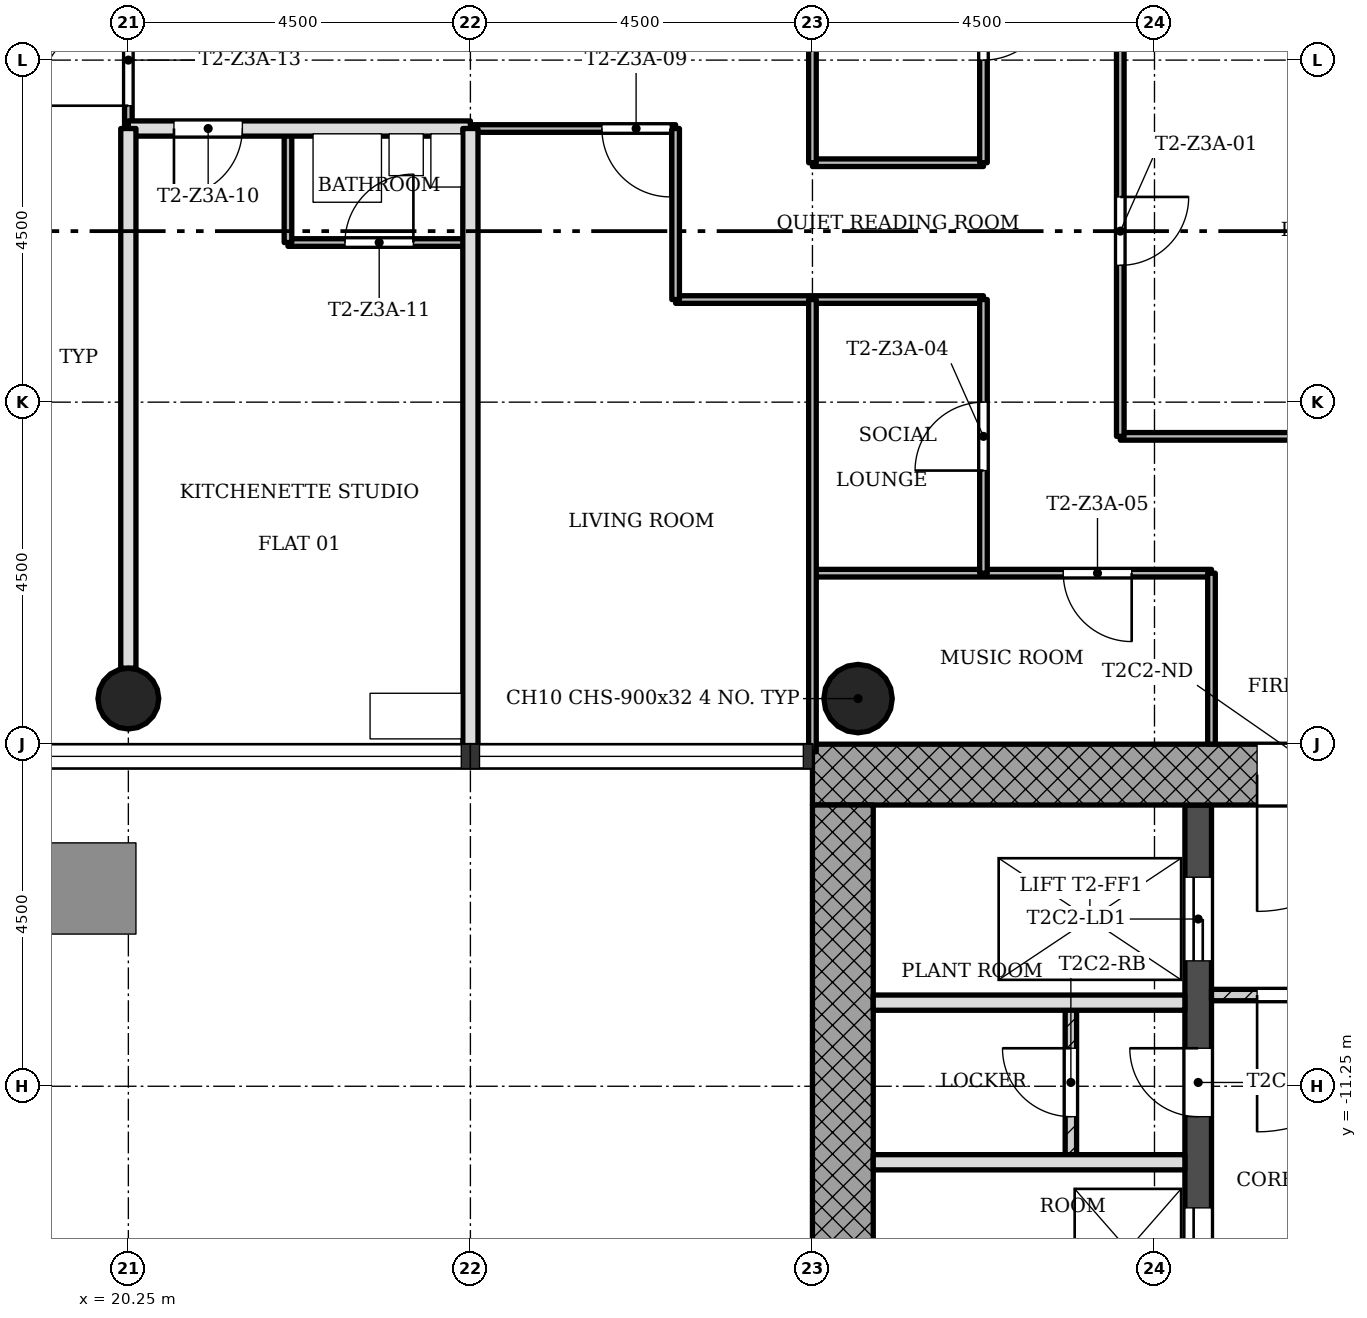
"""IFC4 building model, lengths in metres.
Left out: names, types, materials, properties, quantities, classifications, styles, units other than length and angle.
Written with IfcOpenShell. Run it as: python <this file> out.ifc"""

import sys

from ifc_helpers import new_model, si_unit, direction, frame, frame_2d, origin, origin_2d, place, context, subcontext, project, spatial, rectangle, hollow_circle, extrude, element, fill, save


model = new_model("IFC4")
c1 = context("Model", 3, precision=1e-05, world=origin(), true_north=direction((0.0, 1.0)))
c2 = subcontext(c1, "Body", "Model", "MODEL_VIEW")
j1 = project(units=[si_unit("LENGTHUNIT", "METRE"), si_unit("PLANEANGLEUNIT", "RADIAN")], contexts=[c1])
p1 = place(None, origin())
s1 = spatial("IfcSite", under=j1, at=p1, CompositionType="ELEMENT")
p2 = place(p1, origin())
s2 = spatial("IfcBuilding", under=s1, at=p2, CompositionType="ELEMENT")
p3 = place(p2, frame((0.0, 0.0, 137.1)))
s3 = spatial("IfcBuildingStorey", under=s2, at=p3, CompositionType="ELEMENT", Elevation=137.1)
p4 = place(p3, frame((41.95, -7.15, 0.0), z_axis=(0.0, 0.0, 1.0), x_axis=(-1.0, 0.0, 0.0)))
e1 = element("IfcWall", 1, at=p4, inside=s3, PredefinedType="SHEAR", context=c2, shape_type="SweptSolid", body=[
    extrude(rectangle(XDim=12.7, YDim=0.8, at=frame_2d((6.35, 0.0))), origin(), (0.0, 0.0, 1.0), 3.4),
])
p5 = place(p4, frame((5.05, 0.0, 0.0)))
e2 = element("IfcOpeningElement", 2, at=p5, cuts=e1, PredefinedType="OPENING", context=c2, shape_type="SweptSolid", body=[
    extrude(rectangle(XDim=1.8, YDim=2.1, at=frame_2d((0.9, 1.05))), frame((0.0, 0.41, 0.0), z_axis=(0.0, -1.0, 0.0), x_axis=(1.0, 0.0, 0.0)), (0.0, 0.0, 1.0), 0.82),
])
p6 = place(p3, frame((29.65, -7.55, 0.0), z_axis=(0.0, 0.0, 1.0), x_axis=(0.0, -1.0, 0.0)))
e3 = element("IfcWall", 3, at=p6, inside=s3, PredefinedType="SHEAR", context=c2, shape_type="SweptSolid", body=[
    extrude(rectangle(XDim=8.2, YDim=0.8, at=frame_2d((4.1, 0.0))), origin(), (0.0, 0.0, 1.0), 3.4),
])
p7 = place(p3, frame((34.325, -14.95, 0.0), z_axis=(0.0, 0.0, 1.0), x_axis=(0.0, 1.0, 0.0)))
e4 = element("IfcWall", 4, at=p7, inside=s3, PredefinedType="SHEAR", context=c2, shape_type="SweptSolid", body=[
    extrude(rectangle(XDim=7.4, YDim=0.35, at=frame_2d((3.7, 0.0))), origin(), (0.0, 0.0, 1.0), 3.4),
])
p8 = place(p7, frame((5.35, 0.0, 0.0)))
e5 = element("IfcOpeningElement", 5, at=p8, cuts=e4, PredefinedType="OPENING", context=c2, shape_type="SweptSolid", body=[
    extrude(rectangle(XDim=1.1, YDim=2.1, at=frame_2d((0.55, 1.05))), frame((0.0, 0.185, 0.0), z_axis=(0.0, -1.0, 0.0), x_axis=(1.0, 0.0, 0.0)), (0.0, 0.0, 1.0), 0.37),
])
p9 = place(p7, frame((1.0, 0.0, 0.0)))
e6 = element("IfcOpeningElement", 6, at=p9, cuts=e4, PredefinedType="OPENING", context=c2, shape_type="SweptSolid", body=[
    extrude(rectangle(XDim=1.1, YDim=2.1, at=frame_2d((0.55, 1.05))), frame((0.0, 0.185, 0.0), z_axis=(0.0, -1.0, 0.0), x_axis=(1.0, 0.0, 0.0)), (0.0, 0.0, 1.0), 0.37),
])
p10 = place(p7, frame((3.3, 0.0, 0.0)))
e7 = element("IfcOpeningElement", 7, at=p10, cuts=e4, PredefinedType="OPENING", context=c2, shape_type="SweptSolid", body=[
    extrude(rectangle(XDim=0.9, YDim=2.1, at=frame_2d((0.45, 1.05))), frame((0.0, 0.185, 0.0), z_axis=(0.0, -1.0, 0.0), x_axis=(1.0, 0.0, 0.0)), (0.0, 0.0, 1.0), 0.37),
])
p11 = place(p3, frame((20.25, -6.15, 0.0), z_axis=(0.0, 0.0, 1.0), x_axis=(1.0, 0.0, 0.0)))
e8 = element("IfcColumn", 8, at=p11, inside=s3, PredefinedType="COLUMN", context=c2, shape_type="SweptSolid", body=[
    extrude(hollow_circle(Radius=0.4, WallThickness=0.028, at=origin_2d()), origin(), (0.0, 0.0, 1.0), 3.4),
])
p12 = place(p3, frame((29.85, -6.15, 0.0), z_axis=(0.0, 0.0, 1.0), x_axis=(1.0, 0.0, 0.0)))
e9 = element("IfcColumn", 9, at=p12, inside=s3, PredefinedType="COLUMN", context=c2, shape_type="SweptSolid", body=[
    extrude(hollow_circle(Radius=0.45, WallThickness=0.032, at=origin_2d()), origin(), (0.0, 0.0, 1.0), 3.4),
])
p13 = place(p3, frame((34.5, -10.05, 0.0), z_axis=(0.0, 0.0, 1.0), x_axis=(1.0, 0.0, 0.0)))
e10 = element("IfcWall", 10, at=p13, inside=s3, PredefinedType="PARTITIONING", context=c2, shape_type="SweptSolid", body=[
    extrude(rectangle(XDim=3.0, YDim=0.15, at=frame_2d((1.5, 0.0))), origin(), (0.0, 0.0, 1.0), 3.0),
])
p14 = place(p13, frame((0.6, 0.0, 0.0)))
e11 = element("IfcOpeningElement", 11, at=p14, cuts=e10, PredefinedType="OPENING", context=c2, shape_type="SweptSolid", body=[
    extrude(rectangle(XDim=1.8, YDim=2.1, at=frame_2d((0.9, 1.05))), frame((0.0, 0.085, 0.0), z_axis=(0.0, -1.0, 0.0), x_axis=(1.0, 0.0, 0.0)), (0.0, 0.0, 1.0), 0.17),
])
for number, where, z_axis, x_axis in (
    (12, (30.05, -12.25, 0.0), (0.0, 0.0, 1.0), (1.0, 0.0, 0.0)),
    (13, (30.05, -10.15, 0.0), (0.0, 0.0, 1.0), (1.0, 0.0, 0.0)),
):
    element("IfcWall", number, at=place(p3, frame(where, z_axis=z_axis, x_axis=x_axis)), inside=s3, PredefinedType="SOLIDWALL", context=c2, shape_type="SweptSolid", body=[
        extrude(rectangle(XDim=4.1, YDim=0.2, at=frame_2d((2.05, 0.0))), origin(), (0.0, 0.0, 1.0), 3.0),
    ])
p15 = place(p3, frame((32.65, -10.15, 0.0), z_axis=(0.0, 0.0, 1.0), x_axis=(0.0, -1.0, 0.0)))
e14 = element("IfcWall", 14, at=p15, inside=s3, PredefinedType="PARTITIONING", context=c2, shape_type="SweptSolid", body=[
    extrude(rectangle(XDim=2.1, YDim=0.15, at=frame_2d((1.05, 0.0))), origin(), (0.0, 0.0, 1.0), 3.0),
])
p16 = place(p15, frame((0.6, 0.0, 0.0)))
e15 = element("IfcOpeningElement", 15, at=p16, cuts=e14, PredefinedType="OPENING", context=c2, shape_type="SweptSolid", body=[
    extrude(rectangle(XDim=0.9, YDim=2.1, at=frame_2d((0.45, 1.05))), frame((0.0, 0.085, 0.0), z_axis=(0.0, -1.0, 0.0), x_axis=(1.0, 0.0, 0.0)), (0.0, 0.0, 1.0), 0.17),
])
p17 = place(p3, frame((34.5, -4.5, 0.0), z_axis=(0.0, 0.0, 1.0), x_axis=(-1.0, 0.0, 0.0)))
e16 = element("IfcWall", 16, at=p17, inside=s3, PredefinedType="PARTITIONING", context=c2, shape_type="SweptSolid", body=[
    extrude(rectangle(XDim=5.25, YDim=0.1, at=frame_2d((2.625, 0.0))), origin(), (0.0, 0.0, 1.0), 3.0),
])
p18 = place(p17, frame((1.05, 0.0, 0.0)))
e17 = element("IfcOpeningElement", 17, at=p18, cuts=e16, PredefinedType="OPENING", context=c2, shape_type="SweptSolid", body=[
    extrude(rectangle(XDim=0.9, YDim=2.1, at=frame_2d((0.45, 1.05))), frame((0.0, 0.06, 0.0), z_axis=(0.0, -1.0, 0.0), x_axis=(1.0, 0.0, 0.0)), (0.0, 0.0, 1.0), 0.12),
])
p19 = place(p3, frame((38.7, -2.7, 0.0), z_axis=(0.0, 0.0, 1.0), x_axis=(-1.0, 0.0, 0.0)))
e18 = element("IfcWall", 18, at=p19, inside=s3, PredefinedType="PARTITIONING", context=c2, shape_type="SweptSolid", body=[
    extrude(rectangle(XDim=5.4, YDim=0.1, at=frame_2d((2.7, 0.0))), origin(), (0.0, 0.0, 1.0), 3.0),
])
p20 = place(p3, frame((31.5, -0.9, 0.0), z_axis=(0.0, 0.0, 1.0), x_axis=(-1.0, 0.0, 0.0)))
e19 = element("IfcWall", 19, at=p20, inside=s3, PredefinedType="PARTITIONING", context=c2, shape_type="SweptSolid", body=[
    extrude(rectangle(XDim=4.05, YDim=0.1, at=frame_2d((2.025, 0.0))), origin(), (0.0, 0.0, 1.0), 3.0),
])
p21 = place(p3, frame((24.75, -0.15, 0.0), z_axis=(0.0, 0.0, 1.0), x_axis=(-1.0, 0.0, 0.0)))
e20 = element("IfcWall", 20, at=p21, inside=s3, PredefinedType="PARTITIONING", context=c2, shape_type="SweptSolid", body=[
    extrude(rectangle(XDim=2.4, YDim=0.1, at=frame_2d((1.2, 0.0))), origin(), (0.0, 0.0, 1.0), 3.0),
])
p22 = place(p21, frame((0.75, 0.0, 0.0)))
e21 = element("IfcOpeningElement", 21, at=p22, cuts=e20, PredefinedType="OPENING", context=c2, shape_type="SweptSolid", body=[
    extrude(rectangle(XDim=0.9, YDim=2.1, at=frame_2d((0.45, 1.05))), frame((0.0, 0.06, 0.0), z_axis=(0.0, -1.0, 0.0), x_axis=(1.0, 0.0, 0.0)), (0.0, 0.0, 1.0), 0.12),
])
p23 = place(p3, frame((31.5, 0.9, 0.0), z_axis=(0.0, 0.0, 1.0), x_axis=(-1.0, 0.0, 0.0)))
e22 = element("IfcWall", 22, at=p23, inside=s3, PredefinedType="PARTITIONING", context=c2, shape_type="SweptSolid", body=[
    extrude(rectangle(XDim=2.25, YDim=0.1, at=frame_2d((1.125, 0.0))), origin(), (0.0, 0.0, 1.0), 3.0),
])
p24 = place(p3, frame((27.45, 1.35, 0.0), z_axis=(0.0, 0.0, 1.0), x_axis=(-1.0, 0.0, 0.0)))
e23 = element("IfcWall", 23, at=p24, inside=s3, PredefinedType="PARTITIONING", context=c2, shape_type="SweptSolid", body=[
    extrude(rectangle(XDim=2.7, YDim=0.1, at=frame_2d((1.35, 0.0))), origin(), (0.0, 0.0, 1.0), 3.0),
])
p25 = place(p24, frame((0.07, 0.0, 0.0)))
e24 = element("IfcOpeningElement", 24, at=p25, cuts=e23, PredefinedType="OPENING", context=c2, shape_type="SweptSolid", body=[
    extrude(rectangle(XDim=0.9, YDim=2.1, at=frame_2d((0.45, 1.05))), frame((0.0, 0.06, 0.0), z_axis=(0.0, -1.0, 0.0), x_axis=(1.0, 0.0, 0.0)), (0.0, 0.0, 1.0), 0.12),
])
p26 = place(p3, frame((24.75, 1.35, 0.0), z_axis=(0.0, 0.0, 1.0), x_axis=(-1.0, 0.0, 0.0)))
e25 = element("IfcWall", 25, at=p26, inside=s3, PredefinedType="SOLIDWALL", context=c2, shape_type="SweptSolid", body=[
    extrude(rectangle(XDim=4.5, YDim=0.2, at=frame_2d((2.25, 0.0))), origin(), (0.0, 0.0, 1.0), 3.0),
])
p27 = place(p26, frame((3.0, 0.0, 0.0)))
e26 = element("IfcOpeningElement", 26, at=p27, cuts=e25, PredefinedType="OPENING", context=c2, shape_type="SweptSolid", body=[
    extrude(rectangle(XDim=0.9, YDim=2.1, at=frame_2d((0.45, 1.05))), frame((0.0, 0.11, 0.0), z_axis=(0.0, -1.0, 0.0), x_axis=(1.0, 0.0, 0.0)), (0.0, 0.0, 1.0), 0.22),
])
p28 = place(p3, frame((34.5, -6.75, 0.0), z_axis=(0.0, 0.0, 1.0), x_axis=(0.0, 1.0, 0.0)))
e27 = element("IfcWall", 27, at=p28, inside=s3, PredefinedType="PARTITIONING", context=c2, shape_type="SweptSolid", body=[
    extrude(rectangle(XDim=2.25, YDim=0.1, at=frame_2d((1.125, 0.0))), origin(), (0.0, 0.0, 1.0), 3.0),
])
p29 = place(p3, frame((33.3, -2.7, 0.0), z_axis=(0.0, 0.0, 1.0), x_axis=(0.0, 1.0, 0.0)))
e28 = element("IfcWall", 28, at=p29, inside=s3, PredefinedType="PARTITIONING", context=c2, shape_type="SweptSolid", body=[
    extrude(rectangle(XDim=5.4, YDim=0.1, at=frame_2d((2.7, 0.0))), origin(), (0.0, 0.0, 1.0), 3.0),
])
p30 = place(p29, frame((2.25, 0.0, 0.0)))
e29 = element("IfcOpeningElement", 29, at=p30, cuts=e28, PredefinedType="OPENING", context=c2, shape_type="SweptSolid", body=[
    extrude(rectangle(XDim=0.9, YDim=2.1, at=frame_2d((0.45, 1.05))), frame((0.0, 0.06, 0.0), z_axis=(0.0, -1.0, 0.0), x_axis=(1.0, 0.0, 0.0)), (0.0, 0.0, 1.0), 0.12),
])
p31 = place(p3, frame((31.5, -4.5, 0.0), z_axis=(0.0, 0.0, 1.0), x_axis=(0.0, 1.0, 0.0)))
e30 = element("IfcWall", 30, at=p31, inside=s3, PredefinedType="PARTITIONING", context=c2, shape_type="SweptSolid", body=[
    extrude(rectangle(XDim=3.6, YDim=0.1, at=frame_2d((1.8, 0.0))), origin(), (0.0, 0.0, 1.0), 3.0),
])
p32 = place(p31, frame((1.35, 0.0, 0.0)))
e31 = element("IfcOpeningElement", 31, at=p32, cuts=e30, PredefinedType="OPENING", context=c2, shape_type="SweptSolid", body=[
    extrude(rectangle(XDim=0.9, YDim=2.1, at=frame_2d((0.45, 1.05))), frame((0.0, 0.06, 0.0), z_axis=(0.0, -1.0, 0.0), x_axis=(1.0, 0.0, 0.0)), (0.0, 0.0, 1.0), 0.12),
])
p33 = place(p3, frame((31.5, 0.9, 0.0), z_axis=(0.0, 0.0, 1.0), x_axis=(0.0, 1.0, 0.0)))
e32 = element("IfcWall", 32, at=p33, inside=s3, PredefinedType="PARTITIONING", context=c2, shape_type="SweptSolid", body=[
    extrude(rectangle(XDim=3.6, YDim=0.1, at=frame_2d((1.8, 0.0))), origin(), (0.0, 0.0, 1.0), 3.0),
])
p34 = place(p33, frame((1.35, 0.0, 0.0)))
e33 = element("IfcOpeningElement", 33, at=p34, cuts=e32, PredefinedType="OPENING", context=c2, shape_type="SweptSolid", body=[
    extrude(rectangle(XDim=0.9, YDim=2.1, at=frame_2d((0.45, 1.05))), frame((0.0, 0.06, 0.0), z_axis=(0.0, -1.0, 0.0), x_axis=(1.0, 0.0, 0.0)), (0.0, 0.0, 1.0), 0.12),
])
for number, where, z_axis, x_axis in (
    (34, (29.25, -6.85, 0.0), (0.0, 0.0, 1.0), (0.0, 1.0, 0.0)),
    (35, (29.25, 0.9, 0.0), (0.0, 0.0, 1.0), (0.0, 1.0, 0.0)),
):
    element("IfcWall", number, at=place(p3, frame(where, z_axis=z_axis, x_axis=x_axis)), inside=s3, PredefinedType="PARTITIONING", context=c2, shape_type="SweptSolid", body=[
        extrude(rectangle(XDim=5.95, YDim=0.1, at=frame_2d((2.975, 0.0))), origin(), (0.0, 0.0, 1.0), 3.0),
    ])
p35 = place(p3, frame((27.45, -0.9, 0.0), z_axis=(0.0, 0.0, 1.0), x_axis=(0.0, 1.0, 0.0)))
e36 = element("IfcWall", 36, at=p35, inside=s3, PredefinedType="PARTITIONING", context=c2, shape_type="SweptSolid", body=[
    extrude(rectangle(XDim=2.25, YDim=0.1, at=frame_2d((1.125, 0.0))), origin(), (0.0, 0.0, 1.0), 3.0),
])
p36 = place(p3, frame((24.75, -6.85, 0.0), z_axis=(0.0, 0.0, 1.0), x_axis=(0.0, 1.0, 0.0)))
e37 = element("IfcWall", 37, at=p36, inside=s3, PredefinedType="SOLIDWALL", context=c2, shape_type="SweptSolid", body=[
    extrude(rectangle(XDim=8.2, YDim=0.2, at=frame_2d((4.1, 0.0))), origin(), (0.0, 0.0, 1.0), 3.0),
])
p37 = place(p3, frame((22.35, -0.15, 0.0), z_axis=(0.0, 0.0, 1.0), x_axis=(0.0, 1.0, 0.0)))
e38 = element("IfcWall", 38, at=p37, inside=s3, PredefinedType="PARTITIONING", context=c2, shape_type="SweptSolid", body=[
    extrude(rectangle(XDim=1.5, YDim=0.1, at=frame_2d((0.75, 0.0))), origin(), (0.0, 0.0, 1.0), 3.0),
])
p38 = place(p3, frame((20.25, 1.35, 0.0), z_axis=(0.0, 0.0, 1.0), x_axis=(0.0, 1.0, 0.0)))
e39 = element("IfcWall", 39, at=p38, inside=s3, PredefinedType="PARTITIONING", context=c2, shape_type="SweptSolid", body=[
    extrude(rectangle(XDim=4.4, YDim=0.1, at=frame_2d((2.2, 0.0))), origin(), (0.0, 0.0, 1.0), 3.0),
])
p39 = place(p38, frame((0.3, 0.0, 0.0)))
e40 = element("IfcOpeningElement", 40, at=p39, cuts=e39, PredefinedType="OPENING", context=c2, shape_type="SweptSolid", body=[
    extrude(rectangle(XDim=1.2, YDim=2.1, at=frame_2d((0.6, 1.05))), frame((0.0, 0.06, 0.0), z_axis=(0.0, -1.0, 0.0), x_axis=(1.0, 0.0, 0.0)), (0.0, 0.0, 1.0), 0.12),
])
p40 = place(p3, frame((20.25, -5.75, 0.0), z_axis=(0.0, 0.0, 1.0), x_axis=(0.0, 1.0, 0.0)))
e41 = element("IfcWall", 41, at=p40, inside=s3, PredefinedType="SOLIDWALL", context=c2, shape_type="SweptSolid", body=[
    extrude(rectangle(XDim=7.1, YDim=0.2, at=frame_2d((3.55, 0.0))), origin(), (0.0, 0.0, 1.0), 3.0),
])
p41 = place(p14, origin())
e42 = element("IfcDoor", 42, at=p41, inside=s3, OperationType="SINGLE_SWING_LEFT", PredefinedType="DOOR", context=c2, shape_type="SweptSolid", body=[
    extrude(rectangle(XDim=1.8, YDim=2.1, at=frame_2d((0.9, 1.05))), frame((0.0, 0.025, 0.0), z_axis=(0.0, -1.0, 0.0), x_axis=(1.0, 0.0, 0.0)), (0.0, 0.0, 1.0), 0.05),
])
fill(e11, e42)
p42 = place(p16, origin())
e43 = element("IfcDoor", 43, at=p42, inside=s3, OperationType="SINGLE_SWING_LEFT", PredefinedType="DOOR", context=c2, shape_type="SweptSolid", body=[
    extrude(rectangle(XDim=0.9, YDim=2.1, at=frame_2d((0.45, 1.05))), frame((0.0, 0.025, 0.0), z_axis=(0.0, -1.0, 0.0), x_axis=(1.0, 0.0, 0.0)), (0.0, 0.0, 1.0), 0.05),
])
fill(e15, e43)
p43 = place(p30, origin())
e44 = element("IfcDoor", 44, at=p43, inside=s3, OperationType="SINGLE_SWING_RIGHT", PredefinedType="DOOR", context=c2, shape_type="SweptSolid", body=[
    extrude(rectangle(XDim=0.9, YDim=2.1, at=frame_2d((0.45, 1.05))), frame((0.0, 0.025, 0.0), z_axis=(0.0, -1.0, 0.0), x_axis=(1.0, 0.0, 0.0)), (0.0, 0.0, 1.0), 0.05),
])
fill(e29, e44)
p44 = place(p34, origin())
e45 = element("IfcDoor", 45, at=p44, inside=s3, OperationType="SINGLE_SWING_RIGHT", PredefinedType="DOOR", context=c2, shape_type="SweptSolid", body=[
    extrude(rectangle(XDim=0.9, YDim=2.1, at=frame_2d((0.45, 1.05))), frame((0.0, 0.025, 0.0), z_axis=(0.0, -1.0, 0.0), x_axis=(1.0, 0.0, 0.0)), (0.0, 0.0, 1.0), 0.05),
])
fill(e33, e45)
p45 = place(p32, origin())
e46 = element("IfcDoor", 46, at=p45, inside=s3, OperationType="SINGLE_SWING_RIGHT", PredefinedType="DOOR", context=c2, shape_type="SweptSolid", body=[
    extrude(rectangle(XDim=0.9, YDim=2.1, at=frame_2d((0.45, 1.05))), frame((0.0, 0.025, 0.0), z_axis=(0.0, -1.0, 0.0), x_axis=(1.0, 0.0, 0.0)), (0.0, 0.0, 1.0), 0.05),
])
fill(e31, e46)
p46 = place(p18, origin())
e47 = element("IfcDoor", 47, at=p46, inside=s3, OperationType="SINGLE_SWING_RIGHT", PredefinedType="DOOR", context=c2, shape_type="SweptSolid", body=[
    extrude(rectangle(XDim=0.9, YDim=2.1, at=frame_2d((0.45, 1.05))), frame((0.0, 0.025, 0.0), z_axis=(0.0, -1.0, 0.0), x_axis=(1.0, 0.0, 0.0)), (0.0, 0.0, 1.0), 0.05),
])
fill(e17, e47)
p47 = place(p25, origin())
e48 = element("IfcDoor", 48, at=p47, inside=s3, OperationType="SINGLE_SWING_RIGHT", PredefinedType="DOOR", context=c2, shape_type="SweptSolid", body=[
    extrude(rectangle(XDim=0.9, YDim=2.1, at=frame_2d((0.45, 1.05))), frame((0.0, 0.025, 0.0), z_axis=(0.0, -1.0, 0.0), x_axis=(1.0, 0.0, 0.0)), (0.0, 0.0, 1.0), 0.05),
])
fill(e24, e48)
p48 = place(p27, origin())
e49 = element("IfcDoor", 49, at=p48, inside=s3, OperationType="SINGLE_SWING_LEFT", PredefinedType="DOOR", context=c2, shape_type="SweptSolid", body=[
    extrude(rectangle(XDim=0.9, YDim=2.1, at=frame_2d((0.45, 1.05))), frame((0.0, 0.025, 0.0), z_axis=(0.0, -1.0, 0.0), x_axis=(1.0, 0.0, 0.0)), (0.0, 0.0, 1.0), 0.05),
])
fill(e26, e49)
p49 = place(p22, origin())
e50 = element("IfcDoor", 50, at=p49, inside=s3, OperationType="SINGLE_SWING_LEFT", PredefinedType="DOOR", context=c2, shape_type="SweptSolid", body=[
    extrude(rectangle(XDim=0.9, YDim=2.1, at=frame_2d((0.45, 1.05))), frame((0.0, 0.025, 0.0), z_axis=(0.0, -1.0, 0.0), x_axis=(1.0, 0.0, 0.0)), (0.0, 0.0, 1.0), 0.05),
])
fill(e21, e50)
p50 = place(p39, origin())
e51 = element("IfcDoor", 51, at=p50, inside=s3, OperationType="SINGLE_SWING_RIGHT", PredefinedType="DOOR", context=c2, shape_type="SweptSolid", body=[
    extrude(rectangle(XDim=1.2, YDim=2.1, at=frame_2d((0.6, 1.05))), frame((0.0, 0.025, 0.0), z_axis=(0.0, -1.0, 0.0), x_axis=(1.0, 0.0, 0.0)), (0.0, 0.0, 1.0), 0.05),
])
fill(e40, e51)
p51 = place(p8, origin())
e52 = element("IfcDoor", 52, at=p51, inside=s3, OperationType="SLIDING_TO_LEFT", PredefinedType="DOOR", context=c2, shape_type="SweptSolid", body=[
    extrude(rectangle(XDim=1.1, YDim=2.1, at=frame_2d((0.55, 1.05))), frame((0.0, 0.025, 0.0), z_axis=(0.0, -1.0, 0.0), x_axis=(1.0, 0.0, 0.0)), (0.0, 0.0, 1.0), 0.05),
])
fill(e5, e52)
p52 = place(p9, origin())
e53 = element("IfcDoor", 53, at=p52, inside=s3, OperationType="SLIDING_TO_LEFT", PredefinedType="DOOR", context=c2, shape_type="SweptSolid", body=[
    extrude(rectangle(XDim=1.1, YDim=2.1, at=frame_2d((0.55, 1.05))), frame((0.0, 0.025, 0.0), z_axis=(0.0, -1.0, 0.0), x_axis=(1.0, 0.0, 0.0)), (0.0, 0.0, 1.0), 0.05),
])
fill(e6, e53)
p53 = place(p10, origin())
e54 = element("IfcDoor", 54, at=p53, inside=s3, OperationType="SINGLE_SWING_LEFT", PredefinedType="DOOR", context=c2, shape_type="SweptSolid", body=[
    extrude(rectangle(XDim=0.9, YDim=2.1, at=frame_2d((0.45, 1.05))), frame((0.0, 0.025, 0.0), z_axis=(0.0, -1.0, 0.0), x_axis=(1.0, 0.0, 0.0)), (0.0, 0.0, 1.0), 0.05),
])
fill(e7, e54)
p54 = place(p5, origin())
e55 = element("IfcDoor", 55, at=p54, inside=s3, OperationType="SINGLE_SWING_LEFT", PredefinedType="DOOR", context=c2, shape_type="SweptSolid", body=[
    extrude(rectangle(XDim=1.8, YDim=2.1, at=frame_2d((0.9, 1.05))), frame((0.0, 0.025, 0.0), z_axis=(0.0, -1.0, 0.0), x_axis=(1.0, 0.0, 0.0)), (0.0, 0.0, 1.0), 0.05),
])
fill(e2, e55)
save(model, sys.argv[1])
